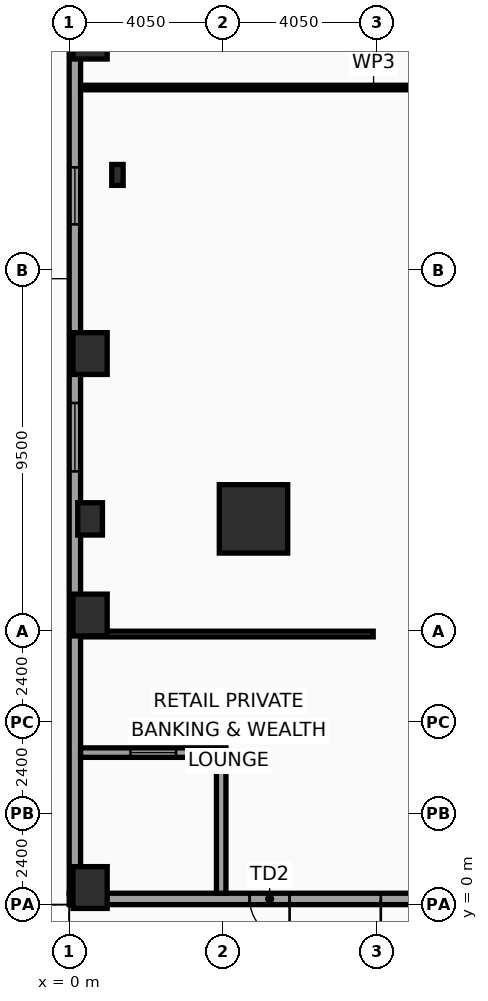
"""IFC4 building model, lengths in metres.
Left out: names, types, materials, properties, quantities, classifications, styles, units other than length and angle.
Written with IfcOpenShell. Run it as: python <this file> out.ifc"""

import sys

from ifc_helpers import new_model, si_unit, direction, frame, frame_2d, origin, origin_2d, place, context, subcontext, project, spatial, rectangle, hollow_rectangle, i_section, extrude, element, fill, save


model = new_model("IFC4")
c1 = context("Model", 3, precision=1e-05, world=origin(), true_north=direction((0.0, 1.0)))
c2 = subcontext(c1, "Body", "Model", "MODEL_VIEW")
j1 = project(units=[si_unit("LENGTHUNIT", "METRE"), si_unit("PLANEANGLEUNIT", "RADIAN")], contexts=[c1])
p1 = place(None, origin())
s1 = spatial("IfcSite", under=j1, at=p1, CompositionType="ELEMENT")
p2 = place(p1, origin())
s2 = spatial("IfcBuilding", under=s1, at=p2, CompositionType="ELEMENT")
p3 = place(p2, origin())
s3 = spatial("IfcBuildingStorey", under=s2, at=p3, CompositionType="ELEMENT", Elevation=0.0)
p4 = place(p3, frame((4.85, 10.15, 0.0), z_axis=(0.0, 0.0, 1.0), x_axis=(1.0, 0.0, 0.0)))
e1 = element("IfcColumn", 1, at=p4, inside=s3, PredefinedType="COLUMN", context=c2, shape_type="SweptSolid", body=[
    extrude(hollow_rectangle(XDim=1.8, YDim=1.8, WallThickness=0.08, at=origin_2d()), origin(), (0.0, 0.0, 1.0), 5.4),
])
p5 = place(p3, frame((1.27, 19.2, 0.0), z_axis=(0.0, 0.0, 1.0), x_axis=(1.0, 0.0, 0.0)))
e2 = element("IfcColumn", 2, at=p5, inside=s3, PredefinedType="COLUMN", context=c2, shape_type="SweptSolid", body=[
    extrude(i_section(OverallWidth=0.3, OverallDepth=0.55, WebThickness=0.015, FlangeThickness=0.029, at=origin_2d()), origin(), (0.0, 0.0, 1.0), 5.4),
])
p6 = place(p3, frame((0.55, 7.62, 0.0), z_axis=(0.0, 0.0, 1.0), x_axis=(1.0, 0.0, 0.0)))
e3 = element("IfcColumn", 3, at=p6, inside=s3, PredefinedType="PILASTER", context=c2, shape_type="SweptSolid", body=[
    extrude(rectangle(XDim=0.9, YDim=1.1, at=origin_2d()), origin(), (0.0, 0.0, 1.0), 5.4),
])
p7 = place(p3, frame((0.55, 10.15, 0.0), z_axis=(0.0, 0.0, 1.0), x_axis=(1.0, 0.0, 0.0)))
e4 = element("IfcColumn", 4, at=p7, inside=s3, PredefinedType="PILASTER", context=c2, shape_type="SweptSolid", body=[
    extrude(rectangle(XDim=0.65, YDim=0.85, at=origin_2d()), origin(), (0.0, 0.0, 1.0), 5.4),
])
for number, where, z_axis, x_axis in (
    (5, (0.55, 14.5, 0.0), (0.0, 0.0, 1.0), (1.0, 0.0, 0.0)),
    (6, (0.55, 22.8, 0.0), (0.0, 0.0, 1.0), (1.0, 0.0, 0.0)),
    (7, (0.55, 0.45, 0.0), (0.0, 0.0, 1.0), (1.0, 0.0, 0.0)),
):
    element("IfcColumn", number, at=place(p3, frame(where, z_axis=z_axis, x_axis=x_axis)), inside=s3, PredefinedType="PILASTER", context=c2, shape_type="SweptSolid", body=[
        extrude(rectangle(XDim=0.9, YDim=1.1, at=origin_2d()), origin(), (0.0, 0.0, 1.0), 5.4),
    ])
p8 = place(p3, frame((72.9, 0.15, 0.0), z_axis=(0.0, 0.0, 1.0), x_axis=(-1.0, 0.0, 0.0)))
e8 = element("IfcWall", 8, at=p8, inside=s3, PredefinedType="SOLIDWALL", context=c2, shape_type="SweptSolid", body=[
    extrude(rectangle(XDim=72.9, YDim=0.3, at=frame_2d((36.45, 0.0))), origin(), (0.0, 0.0, 1.0), 4.54),
])
p9 = place(p8, frame((6.5, 0.0, 0.0)))
e9 = element("IfcOpeningElement", 9, at=p9, cuts=e8, PredefinedType="OPENING", context=c2, shape_type="SweptSolid", body=[
    extrude(rectangle(XDim=2.0, YDim=2.5, at=frame_2d((1.0, 1.25))), frame((0.0, 0.16, 0.0), z_axis=(0.0, -1.0, 0.0), x_axis=(1.0, 0.0, 0.0)), (0.0, 0.0, 1.0), 0.32),
])
p10 = place(p8, frame((11.5, 0.0, 0.0)))
e10 = element("IfcOpeningElement", 10, at=p10, cuts=e8, PredefinedType="OPENING", context=c2, shape_type="SweptSolid", body=[
    extrude(rectangle(XDim=2.0, YDim=2.5, at=frame_2d((1.0, 1.25))), frame((0.0, 0.16, 0.0), z_axis=(0.0, -1.0, 0.0), x_axis=(1.0, 0.0, 0.0)), (0.0, 0.0, 1.0), 0.32),
])
p11 = place(p8, frame((62.7, 0.0, 0.0)))
e11 = element("IfcOpeningElement", 11, at=p11, cuts=e8, PredefinedType="OPENING", context=c2, shape_type="SweptSolid", body=[
    extrude(rectangle(XDim=2.0, YDim=2.5, at=frame_2d((1.0, 1.25))), frame((0.0, 0.16, 0.0), z_axis=(0.0, -1.0, 0.0), x_axis=(1.0, 0.0, 0.0)), (0.0, 0.0, 1.0), 0.32),
])
p12 = place(p8, frame((67.1, 0.0, 0.0)))
e12 = element("IfcOpeningElement", 12, at=p12, cuts=e8, PredefinedType="OPENING", context=c2, shape_type="SweptSolid", body=[
    extrude(rectangle(XDim=1.05, YDim=2.15, at=frame_2d((0.525, 1.075))), frame((0.0, 0.16, 0.0), z_axis=(0.0, -1.0, 0.0), x_axis=(1.0, 0.0, 0.0)), (0.0, 0.0, 1.0), 0.32),
])
p13 = place(p8, frame((2.9, 0.0, 0.0)))
e13 = element("IfcOpeningElement", 13, at=p13, cuts=e8, PredefinedType="OPENING", context=c2, shape_type="SweptSolid", body=[
    extrude(rectangle(XDim=1.05, YDim=2.15, at=frame_2d((0.525, 1.075))), frame((0.0, 0.16, 0.0), z_axis=(0.0, -1.0, 0.0), x_axis=(1.0, 0.0, 0.0)), (0.0, 0.0, 1.0), 0.32),
])
p14 = place(p8, frame((18.8, 0.0, 0.9)))
e14 = element("IfcOpeningElement", 14, at=p14, cuts=e8, PredefinedType="OPENING", context=c2, shape_type="SweptSolid", body=[
    extrude(rectangle(XDim=1.5, YDim=2.4, at=frame_2d((0.75, 1.2))), frame((0.0, 0.16, 0.0), z_axis=(0.0, -1.0, 0.0), x_axis=(1.0, 0.0, 0.0)), (0.0, 0.0, 1.0), 0.32),
])
p15 = place(p8, frame((27.9, 0.0, 0.9)))
e15 = element("IfcOpeningElement", 15, at=p15, cuts=e8, PredefinedType="OPENING", context=c2, shape_type="SweptSolid", body=[
    extrude(rectangle(XDim=1.8, YDim=3.2, at=frame_2d((0.9, 1.6))), frame((0.0, 0.16, 0.0), z_axis=(0.0, -1.0, 0.0), x_axis=(1.0, 0.0, 0.0)), (0.0, 0.0, 1.0), 0.32),
])
p16 = place(p8, frame((37.1, 0.0, 0.9)))
e16 = element("IfcOpeningElement", 16, at=p16, cuts=e8, PredefinedType="OPENING", context=c2, shape_type="SweptSolid", body=[
    extrude(rectangle(XDim=1.5, YDim=2.4, at=frame_2d((0.75, 1.2))), frame((0.0, 0.16, 0.0), z_axis=(0.0, -1.0, 0.0), x_axis=(1.0, 0.0, 0.0)), (0.0, 0.0, 1.0), 0.32),
])
p17 = place(p8, frame((46.5, 0.0, 0.9)))
e17 = element("IfcOpeningElement", 17, at=p17, cuts=e8, PredefinedType="OPENING", context=c2, shape_type="SweptSolid", body=[
    extrude(rectangle(XDim=1.8, YDim=3.2, at=frame_2d((0.9, 1.6))), frame((0.0, 0.16, 0.0), z_axis=(0.0, -1.0, 0.0), x_axis=(1.0, 0.0, 0.0)), (0.0, 0.0, 1.0), 0.32),
])
p18 = place(p8, frame((54.7, 0.0, 0.9)))
e18 = element("IfcOpeningElement", 18, at=p18, cuts=e8, PredefinedType="OPENING", context=c2, shape_type="SweptSolid", body=[
    extrude(rectangle(XDim=1.5, YDim=2.4, at=frame_2d((0.75, 1.2))), frame((0.0, 0.16, 0.0), z_axis=(0.0, -1.0, 0.0), x_axis=(1.0, 0.0, 0.0)), (0.0, 0.0, 1.0), 0.32),
])
p19 = place(p3, frame((0.15, 49.575, 0.0), z_axis=(0.0, 0.0, 1.0), x_axis=(0.0, -1.0, 0.0)))
e19 = element("IfcWall", 19, at=p19, inside=s3, PredefinedType="SOLIDWALL", context=c2, shape_type="SweptSolid", body=[
    extrude(rectangle(XDim=49.275, YDim=0.3, at=frame_2d((24.637, 0.0))), origin(), (0.0, 0.0, 1.0), 4.54),
])
p20 = place(p19, frame((3.075, 0.0, 0.9)))
e20 = element("IfcOpeningElement", 20, at=p20, cuts=e19, PredefinedType="OPENING", context=c2, shape_type="SweptSolid", body=[
    extrude(rectangle(XDim=1.8, YDim=3.2, at=frame_2d((0.9, 1.6))), frame((0.0, 0.16, 0.0), z_axis=(0.0, -1.0, 0.0), x_axis=(1.0, 0.0, 0.0)), (0.0, 0.0, 1.0), 0.32),
])
p21 = place(p19, frame((12.525, 0.0, 0.9)))
e21 = element("IfcOpeningElement", 21, at=p21, cuts=e19, PredefinedType="OPENING", context=c2, shape_type="SweptSolid", body=[
    extrude(rectangle(XDim=1.5, YDim=2.4, at=frame_2d((0.75, 1.2))), frame((0.0, 0.16, 0.0), z_axis=(0.0, -1.0, 0.0), x_axis=(1.0, 0.0, 0.0)), (0.0, 0.0, 1.0), 0.32),
])
p22 = place(p19, frame((21.725, 0.0, 0.9)))
e22 = element("IfcOpeningElement", 22, at=p22, cuts=e19, PredefinedType="OPENING", context=c2, shape_type="SweptSolid", body=[
    extrude(rectangle(XDim=1.8, YDim=3.2, at=frame_2d((0.9, 1.6))), frame((0.0, 0.16, 0.0), z_axis=(0.0, -1.0, 0.0), x_axis=(1.0, 0.0, 0.0)), (0.0, 0.0, 1.0), 0.32),
])
p23 = place(p19, frame((30.175, 0.0, 0.9)))
e23 = element("IfcOpeningElement", 23, at=p23, cuts=e19, PredefinedType="OPENING", context=c2, shape_type="SweptSolid", body=[
    extrude(rectangle(XDim=1.5, YDim=2.4, at=frame_2d((0.75, 1.2))), frame((0.0, 0.16, 0.0), z_axis=(0.0, -1.0, 0.0), x_axis=(1.0, 0.0, 0.0)), (0.0, 0.0, 1.0), 0.32),
])
p24 = place(p19, frame((36.375, 0.0, 0.9)))
e24 = element("IfcOpeningElement", 24, at=p24, cuts=e19, PredefinedType="OPENING", context=c2, shape_type="SweptSolid", body=[
    extrude(rectangle(XDim=1.8, YDim=3.2, at=frame_2d((0.9, 1.6))), frame((0.0, 0.16, 0.0), z_axis=(0.0, -1.0, 0.0), x_axis=(1.0, 0.0, 0.0)), (0.0, 0.0, 1.0), 0.32),
])
p25 = place(p3, frame((4.125, 4.0, 0.0), z_axis=(0.0, 0.0, 1.0), x_axis=(-1.0, 0.0, 0.0)))
e25 = element("IfcWall", 25, at=p25, inside=s3, PredefinedType="SOLIDWALL", context=c2, shape_type="SweptSolid", body=[
    extrude(rectangle(XDim=3.825, YDim=0.25, at=frame_2d((1.913, 0.0))), origin(), (0.0, 0.0, 1.0), 4.54),
])
p26 = place(p25, frame((1.312, 0.0, 0.9)))
e26 = element("IfcOpeningElement", 26, at=p26, cuts=e25, PredefinedType="OPENING", context=c2, shape_type="SweptSolid", body=[
    extrude(rectangle(XDim=1.2, YDim=2.8, at=frame_2d((0.6, 1.4))), frame((0.0, 0.135, 0.0), z_axis=(0.0, -1.0, 0.0), x_axis=(1.0, 0.0, 0.0)), (0.0, 0.0, 1.0), 0.27),
])
p27 = place(p3, frame((4.0, 0.3, 0.0), z_axis=(0.0, 0.0, 1.0), x_axis=(0.0, 1.0, 0.0)))
e27 = element("IfcWall", 27, at=p27, inside=s3, PredefinedType="SOLIDWALL", context=c2, shape_type="SweptSolid", body=[
    extrude(rectangle(XDim=3.575, YDim=0.25, at=frame_2d((1.788, 0.0))), origin(), (0.0, 0.0, 1.0), 4.54),
])
p28 = place(p3, frame((0.3, 7.12, 0.0), z_axis=(0.0, 0.0, 1.0), x_axis=(1.0, 0.0, 0.0)))
e28 = element("IfcWall", 28, at=p28, inside=s3, PredefinedType="PARTITIONING", context=c2, shape_type="SweptSolid", body=[
    extrude(rectangle(XDim=7.7, YDim=0.15, at=frame_2d((3.85, 0.0))), origin(), (0.0, 0.0, 1.0), 4.54),
])
p29 = place(p3, frame((0.3, 21.5, 0.0), z_axis=(0.0, 0.0, 1.0), x_axis=(1.0, 0.0, 0.0)))
e29 = element("IfcWall", 29, at=p29, inside=s3, PredefinedType="PARTITIONING", context=c2, shape_type="SweptSolid", body=[
    extrude(rectangle(XDim=15.42, YDim=0.12, at=frame_2d((7.71, 0.0))), origin(), (0.0, 0.0, 1.0), 4.54),
])
p30 = place(p11, origin())
e30 = element("IfcDoor", 30, at=p30, inside=s3, OperationType="DOUBLE_DOOR_SINGLE_SWING", PredefinedType="DOOR", context=c2, shape_type="SweptSolid", body=[
    extrude(rectangle(XDim=2.0, YDim=2.5, at=frame_2d((1.0, 1.25))), frame((0.0, 0.025, 0.0), z_axis=(0.0, -1.0, 0.0), x_axis=(1.0, 0.0, 0.0)), (0.0, 0.0, 1.0), 0.05),
])
fill(e11, e30)
p31 = place(p12, origin())
e31 = element("IfcDoor", 31, at=p31, inside=s3, OperationType="SINGLE_SWING_LEFT", PredefinedType="DOOR", context=c2, shape_type="SweptSolid", body=[
    extrude(rectangle(XDim=1.05, YDim=2.15, at=frame_2d((0.525, 1.075))), frame((0.0, 0.025, 0.0), z_axis=(0.0, -1.0, 0.0), x_axis=(1.0, 0.0, 0.0)), (0.0, 0.0, 1.0), 0.05),
])
fill(e12, e31)
p32 = place(p23, origin())
e32 = element("IfcWindow", 32, at=p32, inside=s3, PartitioningType="SINGLE_PANEL", PredefinedType="WINDOW", context=c2, shape_type="SweptSolid", body=[
    extrude(rectangle(XDim=1.5, YDim=2.4, at=frame_2d((0.75, 1.2))), frame((0.0, 0.03, 0.0), z_axis=(0.0, -1.0, 0.0), x_axis=(1.0, 0.0, 0.0)), (0.0, 0.0, 1.0), 0.06),
])
fill(e23, e32)
p33 = place(p24, origin())
e33 = element("IfcWindow", 33, at=p33, inside=s3, PartitioningType="SINGLE_PANEL", PredefinedType="WINDOW", context=c2, shape_type="SweptSolid", body=[
    extrude(rectangle(XDim=1.8, YDim=3.2, at=frame_2d((0.9, 1.6))), frame((0.0, 0.03, 0.0), z_axis=(0.0, -1.0, 0.0), x_axis=(1.0, 0.0, 0.0)), (0.0, 0.0, 1.0), 0.06),
])
fill(e24, e33)
p34 = place(p26, origin())
e34 = element("IfcWindow", 34, at=p34, inside=s3, PartitioningType="SINGLE_PANEL", PredefinedType="WINDOW", context=c2, shape_type="SweptSolid", body=[
    extrude(rectangle(XDim=1.2, YDim=2.8, at=frame_2d((0.6, 1.4))), frame((0.0, 0.03, 0.0), z_axis=(0.0, -1.0, 0.0), x_axis=(1.0, 0.0, 0.0)), (0.0, 0.0, 1.0), 0.06),
])
fill(e26, e34)
save(model, sys.argv[1])
